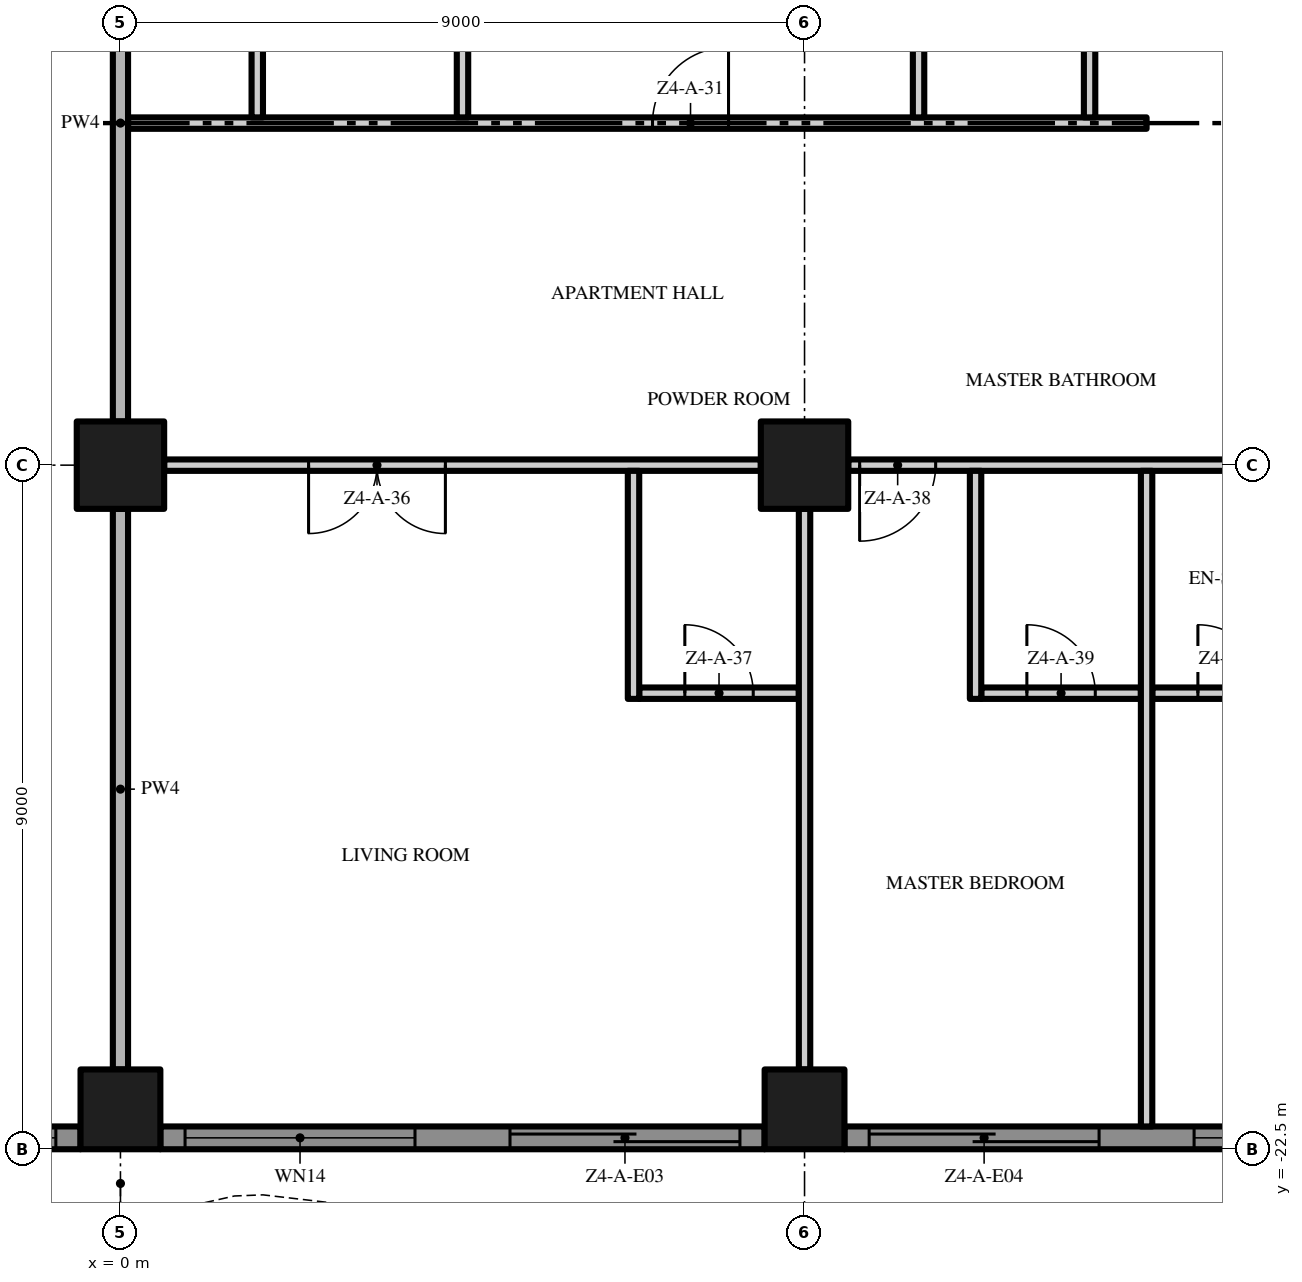
"""IFC4 building model, lengths in metres.
Left out: names, types, materials, properties, quantities, classifications, styles, units other than length and angle.
Written with IfcOpenShell. Run it as: python <this file> out.ifc"""

import sys

from ifc_helpers import new_model, si_unit, direction, frame, frame_2d, origin, origin_2d, place, context, subcontext, project, spatial, polyline, rectangle, outline, extrude, element, fill, save


model = new_model("IFC4")
c1 = context("Model", 3, precision=1e-05, world=origin(), true_north=direction((0.0, 1.0)))
c2 = subcontext(c1, "Body", "Model", "MODEL_VIEW")
j1 = project(units=[si_unit("LENGTHUNIT", "METRE"), si_unit("PLANEANGLEUNIT", "RADIAN")], contexts=[c1])
p1 = place(None, origin())
s1 = spatial("IfcSite", under=j1, at=p1, CompositionType="ELEMENT")
p2 = place(p1, origin())
s2 = spatial("IfcBuilding", under=s1, at=p2, CompositionType="ELEMENT")
p3 = place(p2, frame((0.0, 0.0, 184.4)))
s3 = spatial("IfcBuildingStorey", under=s2, at=p3, CompositionType="ELEMENT", Elevation=184.4)
p4 = place(p3, frame((0.0, -13.5, 0.0), z_axis=(0.0, 0.0, 1.0), x_axis=(1.0, 0.0, 0.0)))
e1 = element("IfcColumn", 1, at=p4, inside=s3, PredefinedType="COLUMN", context=c2, shape_type="SweptSolid", body=[
    extrude(rectangle(XDim=1.15, YDim=1.15, at=origin_2d()), origin(), (0.0, 0.0, 1.0), 3.5),
])
p5 = place(p3, frame((0.0, -21.975, 0.0), z_axis=(0.0, 0.0, 1.0), x_axis=(1.0, 0.0, 0.0)))
e2 = element("IfcColumn", 2, at=p5, inside=s3, PredefinedType="COLUMN", context=c2, shape_type="SweptSolid", body=[
    extrude(rectangle(XDim=1.05, YDim=1.05, at=origin_2d()), origin(), (0.0, 0.0, 1.0), 3.5),
])
p6 = place(p3, frame((9.0, -13.5, 0.0), z_axis=(0.0, 0.0, 1.0), x_axis=(1.0, 0.0, 0.0)))
e3 = element("IfcColumn", 3, at=p6, inside=s3, PredefinedType="COLUMN", context=c2, shape_type="SweptSolid", body=[
    extrude(rectangle(XDim=1.15, YDim=1.15, at=origin_2d()), origin(), (0.0, 0.0, 1.0), 3.5),
])
p7 = place(p3, frame((9.0, -21.975, 0.0), z_axis=(0.0, 0.0, 1.0), x_axis=(1.0, 0.0, 0.0)))
e4 = element("IfcColumn", 4, at=p7, inside=s3, PredefinedType="COLUMN", context=c2, shape_type="SweptSolid", body=[
    extrude(rectangle(XDim=1.05, YDim=1.05, at=origin_2d()), origin(), (0.0, 0.0, 1.0), 3.5),
])
p8 = place(p3, frame((-0.525, -22.35, 0.0), z_axis=(0.0, 0.0, 1.0), x_axis=(-1.0, 0.0, 0.0)))
e5 = element("IfcWall", 5, at=p8, inside=s3, PredefinedType="SOLIDWALL", context=c2, shape_type="SweptSolid", body=[
    extrude(rectangle(XDim=7.95, YDim=0.3, at=frame_2d((3.975, 0.0))), origin(), (0.0, 0.0, 1.0), 3.5),
])
p9 = place(p8, frame((4.6, 0.0, 0.0)))
e6 = element("IfcOpeningElement", 6, at=p9, cuts=e5, PredefinedType="OPENING", context=c2, shape_type="SweptSolid", body=[
    extrude(rectangle(XDim=3.025, YDim=2.4, at=frame_2d((1.512, 1.2))), frame((0.0, 0.16, 0.0), z_axis=(0.0, -1.0, 0.0), x_axis=(1.0, 0.0, 0.0)), (0.0, 0.0, 1.0), 0.32),
])
p10 = place(p8, frame((0.325, 0.0, 0.45)))
e7 = element("IfcOpeningElement", 7, at=p10, cuts=e5, PredefinedType="OPENING", context=c2, shape_type="SweptSolid", body=[
    extrude(rectangle(XDim=3.025, YDim=2.65, at=frame_2d((1.512, 1.325))), frame((0.0, 0.16, 0.0), z_axis=(0.0, -1.0, 0.0), x_axis=(1.0, 0.0, 0.0)), (0.0, 0.0, 1.0), 0.32),
])
p11 = place(p3, frame((8.475, -22.35, 0.0), z_axis=(0.0, 0.0, 1.0), x_axis=(-1.0, 0.0, 0.0)))
e8 = element("IfcWall", 8, at=p11, inside=s3, PredefinedType="SOLIDWALL", context=c2, shape_type="SweptSolid", body=[
    extrude(rectangle(XDim=7.95, YDim=0.3, at=frame_2d((3.975, 0.0))), origin(), (0.0, 0.0, 1.0), 3.5),
])
p12 = place(p11, frame((4.6, 0.0, 0.45)))
e9 = element("IfcOpeningElement", 9, at=p12, cuts=e8, PredefinedType="OPENING", context=c2, shape_type="SweptSolid", body=[
    extrude(rectangle(XDim=3.025, YDim=2.65, at=frame_2d((1.512, 1.325))), frame((0.0, 0.16, 0.0), z_axis=(0.0, -1.0, 0.0), x_axis=(1.0, 0.0, 0.0)), (0.0, 0.0, 1.0), 0.32),
])
p13 = place(p11, frame((0.325, 0.0, 0.0)))
e10 = element("IfcOpeningElement", 10, at=p13, cuts=e8, PredefinedType="OPENING", context=c2, shape_type="SweptSolid", body=[
    extrude(rectangle(XDim=3.025, YDim=2.4, at=frame_2d((1.512, 1.2))), frame((0.0, 0.16, 0.0), z_axis=(0.0, -1.0, 0.0), x_axis=(1.0, 0.0, 0.0)), (0.0, 0.0, 1.0), 0.32),
])
p14 = place(p3, frame((17.475, -22.35, 0.0), z_axis=(0.0, 0.0, 1.0), x_axis=(-1.0, 0.0, 0.0)))
e11 = element("IfcWall", 11, at=p14, inside=s3, PredefinedType="SOLIDWALL", context=c2, shape_type="SweptSolid", body=[
    extrude(rectangle(XDim=7.95, YDim=0.3, at=frame_2d((3.975, 0.0))), origin(), (0.0, 0.0, 1.0), 3.5),
])
p15 = place(p14, frame((4.6, 0.0, 0.0)))
e12 = element("IfcOpeningElement", 12, at=p15, cuts=e11, PredefinedType="OPENING", context=c2, shape_type="SweptSolid", body=[
    extrude(rectangle(XDim=3.025, YDim=2.4, at=frame_2d((1.512, 1.2))), frame((0.0, 0.16, 0.0), z_axis=(0.0, -1.0, 0.0), x_axis=(1.0, 0.0, 0.0)), (0.0, 0.0, 1.0), 0.32),
])
p16 = place(p14, frame((0.325, 0.0, 0.45)))
e13 = element("IfcOpeningElement", 13, at=p16, cuts=e11, PredefinedType="OPENING", context=c2, shape_type="SweptSolid", body=[
    extrude(rectangle(XDim=3.025, YDim=2.65, at=frame_2d((1.512, 1.325))), frame((0.0, 0.16, 0.0), z_axis=(0.0, -1.0, 0.0), x_axis=(1.0, 0.0, 0.0)), (0.0, 0.0, 1.0), 0.32),
])
p17 = place(p3, origin())
e14 = element("IfcWall", 14, at=p17, inside=s3, PredefinedType="USERDEFINED", context=c2, shape_type="SweptSolid", body=[
    extrude(outline(polyline([(-22.5, -25.149), (-21.0, -25.485), (-20.625, -25.5), (-19.5, -25.369), (-18.0, -24.845), (-16.5, -24.112), (-15.0, -23.451), (-13.5, -23.115), (-13.125, -23.1), (-12.0, -23.231), (-10.5, -23.755), (-9.0, -24.488), (-7.5, -25.149), (-6.0, -25.485), (-5.625, -25.5), (-4.5, -25.369), (-3.0, -24.845), (-1.5, -24.112), (0.0, -23.451), (1.5, -23.115), (1.875, -23.1), (3.0, -23.231), (4.5, -23.755), (6.0, -24.488), (7.5, -25.149), (9.0, -25.485), (9.375, -25.5), (10.5, -25.369), (12.0, -24.845), (13.5, -24.112), (15.0, -23.451), (16.5, -23.115), (16.875, -23.1), (18.0, -23.231), (19.5, -23.755), (21.0, -24.488), (22.5, -25.149), (22.601, -24.92), (21.105, -24.261), (19.596, -23.524), (18.056, -22.986), (16.885, -22.849), (16.467, -22.866), (14.921, -23.213), (13.395, -23.885), (11.904, -24.614), (10.444, -25.124), (9.365, -25.249), (9.033, -25.236), (7.579, -24.91), (6.105, -24.261), (4.596, -23.524), (3.056, -22.986), (1.885, -22.849), (1.467, -22.866), (-0.079, -23.213), (-1.605, -23.885), (-3.096, -24.614), (-4.556, -25.124), (-5.635, -25.249), (-5.967, -25.236), (-7.421, -24.91), (-8.895, -24.261), (-10.404, -23.524), (-11.944, -22.986), (-13.115, -22.849), (-13.533, -22.866), (-15.079, -23.213), (-16.605, -23.885), (-18.096, -24.614), (-19.556, -25.124), (-20.635, -25.249), (-20.967, -25.236), (-22.445, -24.905), (-22.5, -25.149)])), origin(), (0.0, 0.0, 1.0), 0.9),
])
p18 = place(p3, frame((6.825, -16.5, 0.0), z_axis=(0.0, 0.0, 1.0), x_axis=(1.0, 0.0, 0.0)))
e15 = element("IfcWall", 15, at=p18, inside=s3, PredefinedType="PARTITIONING", context=c2, shape_type="SweptSolid", body=[
    extrude(rectangle(XDim=2.1, YDim=0.15, at=frame_2d((1.05, 0.0))), origin(), (0.0, 0.0, 1.0), 3.5),
])
p19 = place(p18, frame((0.6, 0.0, 0.0)))
e16 = element("IfcOpeningElement", 16, at=p19, cuts=e15, PredefinedType="OPENING", context=c2, shape_type="SweptSolid", body=[
    extrude(rectangle(XDim=0.9, YDim=2.1, at=frame_2d((0.45, 1.05))), frame((0.0, 0.085, 0.0), z_axis=(0.0, -1.0, 0.0), x_axis=(1.0, 0.0, 0.0)), (0.0, 0.0, 1.0), 0.17),
])
p20 = place(p3, frame((11.325, -16.5, 0.0), z_axis=(0.0, 0.0, 1.0), x_axis=(1.0, 0.0, 0.0)))
e17 = element("IfcWall", 17, at=p20, inside=s3, PredefinedType="PARTITIONING", context=c2, shape_type="SweptSolid", body=[
    extrude(rectangle(XDim=2.1, YDim=0.15, at=frame_2d((1.05, 0.0))), origin(), (0.0, 0.0, 1.0), 3.5),
])
p21 = place(p20, frame((0.6, 0.0, 0.0)))
e18 = element("IfcOpeningElement", 18, at=p21, cuts=e17, PredefinedType="OPENING", context=c2, shape_type="SweptSolid", body=[
    extrude(rectangle(XDim=0.9, YDim=2.1, at=frame_2d((0.45, 1.05))), frame((0.0, 0.085, 0.0), z_axis=(0.0, -1.0, 0.0), x_axis=(1.0, 0.0, 0.0)), (0.0, 0.0, 1.0), 0.17),
])
p22 = place(p3, frame((13.575, -16.5, 0.0), z_axis=(0.0, 0.0, 1.0), x_axis=(1.0, 0.0, 0.0)))
e19 = element("IfcWall", 19, at=p22, inside=s3, PredefinedType="PARTITIONING", context=c2, shape_type="SweptSolid", body=[
    extrude(rectangle(XDim=2.1, YDim=0.15, at=frame_2d((1.05, 0.0))), origin(), (0.0, 0.0, 1.0), 3.5),
])
p23 = place(p22, frame((0.6, 0.0, 0.0)))
e20 = element("IfcOpeningElement", 20, at=p23, cuts=e19, PredefinedType="OPENING", context=c2, shape_type="SweptSolid", body=[
    extrude(rectangle(XDim=0.9, YDim=2.1, at=frame_2d((0.45, 1.05))), frame((0.0, 0.085, 0.0), z_axis=(0.0, -1.0, 0.0), x_axis=(1.0, 0.0, 0.0)), (0.0, 0.0, 1.0), 0.17),
])
p24 = place(p3, frame((8.425, -13.5, 0.0), z_axis=(0.0, 0.0, 1.0), x_axis=(-1.0, 0.0, 0.0)))
e21 = element("IfcWall", 21, at=p24, inside=s3, PredefinedType="PARTITIONING", context=c2, shape_type="SweptSolid", body=[
    extrude(rectangle(XDim=7.85, YDim=0.15, at=frame_2d((3.925, 0.0))), origin(), (0.0, 0.0, 1.0), 3.5),
])
p25 = place(p24, frame((4.15, 0.0, 0.0)))
e22 = element("IfcOpeningElement", 22, at=p25, cuts=e21, PredefinedType="OPENING", context=c2, shape_type="SweptSolid", body=[
    extrude(rectangle(XDim=1.8, YDim=2.4, at=frame_2d((0.9, 1.2))), frame((0.0, 0.085, 0.0), z_axis=(0.0, -1.0, 0.0), x_axis=(1.0, 0.0, 0.0)), (0.0, 0.0, 1.0), 0.17),
])
p26 = place(p3, frame((17.425, -13.5, 0.0), z_axis=(0.0, 0.0, 1.0), x_axis=(-1.0, 0.0, 0.0)))
e23 = element("IfcWall", 23, at=p26, inside=s3, PredefinedType="PARTITIONING", context=c2, shape_type="SweptSolid", body=[
    extrude(rectangle(XDim=7.85, YDim=0.15, at=frame_2d((3.925, 0.0))), origin(), (0.0, 0.0, 1.0), 3.5),
])
p27 = place(p26, frame((6.7, 0.0, 0.0)))
e24 = element("IfcOpeningElement", 24, at=p27, cuts=e23, PredefinedType="OPENING", context=c2, shape_type="SweptSolid", body=[
    extrude(rectangle(XDim=1.0, YDim=2.4, at=frame_2d((0.5, 1.2))), frame((0.0, 0.085, 0.0), z_axis=(0.0, -1.0, 0.0), x_axis=(1.0, 0.0, 0.0)), (0.0, 0.0, 1.0), 0.17),
])
p28 = place(p26, frame((0.15, 0.0, 0.0)))
e25 = element("IfcOpeningElement", 25, at=p28, cuts=e23, PredefinedType="OPENING", context=c2, shape_type="SweptSolid", body=[
    extrude(rectangle(XDim=1.0, YDim=2.4, at=frame_2d((0.5, 1.2))), frame((0.0, 0.085, 0.0), z_axis=(0.0, -1.0, 0.0), x_axis=(1.0, 0.0, 0.0)), (0.0, 0.0, 1.0), 0.17),
])
p29 = place(p3, frame((0.1, -9.0, 0.0), z_axis=(0.0, 0.0, 1.0), x_axis=(1.0, 0.0, 0.0)))
e26 = element("IfcWall", 26, at=p29, inside=s3, PredefinedType="PARTITIONING", context=c2, shape_type="SweptSolid", body=[
    extrude(rectangle(XDim=13.4, YDim=0.15, at=frame_2d((6.7, 0.0))), origin(), (0.0, 0.0, 1.0), 3.5),
])
p30 = place(p29, frame((6.9, 0.0, 0.0)))
e27 = element("IfcOpeningElement", 27, at=p30, cuts=e26, PredefinedType="OPENING", context=c2, shape_type="SweptSolid", body=[
    extrude(rectangle(XDim=1.0, YDim=2.4, at=frame_2d((0.5, 1.2))), frame((0.0, 0.085, 0.0), z_axis=(0.0, -1.0, 0.0), x_axis=(1.0, 0.0, 0.0)), (0.0, 0.0, 1.0), 0.17),
])
p31 = place(p3, frame((0.0, -21.45, 0.0), z_axis=(0.0, 0.0, 1.0), x_axis=(0.0, 1.0, 0.0)))
e28 = element("IfcWall", 28, at=p31, inside=s3, PredefinedType="PARTITIONING", context=c2, shape_type="SweptSolid", body=[
    extrude(rectangle(XDim=7.375, YDim=0.2, at=frame_2d((3.688, 0.0))), origin(), (0.0, 0.0, 1.0), 3.5),
])
p32 = place(p3, frame((0.0, -12.925, 0.0), z_axis=(0.0, 0.0, 1.0), x_axis=(0.0, 1.0, 0.0)))
e29 = element("IfcWall", 29, at=p32, inside=s3, PredefinedType="PARTITIONING", context=c2, shape_type="SweptSolid", body=[
    extrude(rectangle(XDim=7.85, YDim=0.2, at=frame_2d((3.925, 0.0))), origin(), (0.0, 0.0, 1.0), 3.5),
])
for number, where, z_axis, x_axis in (
    (30, (1.8, -8.925, 0.0), (0.0, 0.0, 1.0), (0.0, 1.0, 0.0)),
    (31, (4.5, -8.925, 0.0), (0.0, 0.0, 1.0), (0.0, 1.0, 0.0)),
):
    element("IfcWall", number, at=place(p3, frame(where, z_axis=z_axis, x_axis=x_axis)), inside=s3, PredefinedType="PARTITIONING", context=c2, shape_type="SweptSolid", body=[
        extrude(rectangle(XDim=4.35, YDim=0.15, at=frame_2d((2.175, 0.0))), origin(), (0.0, 0.0, 1.0), 3.5),
    ])
p33 = place(p3, frame((6.75, -16.575, 0.0), z_axis=(0.0, 0.0, 1.0), x_axis=(0.0, 1.0, 0.0)))
e32 = element("IfcWall", 32, at=p33, inside=s3, PredefinedType="PARTITIONING", context=c2, shape_type="SweptSolid", body=[
    extrude(rectangle(XDim=3.0, YDim=0.15, at=frame_2d((1.5, 0.0))), origin(), (0.0, 0.0, 1.0), 3.5),
])
p34 = place(p3, frame((9.0, -21.45, 0.0), z_axis=(0.0, 0.0, 1.0), x_axis=(0.0, 1.0, 0.0)))
e33 = element("IfcWall", 33, at=p34, inside=s3, PredefinedType="PARTITIONING", context=c2, shape_type="SweptSolid", body=[
    extrude(rectangle(XDim=7.375, YDim=0.15, at=frame_2d((3.688, 0.0))), origin(), (0.0, 0.0, 1.0), 3.5),
])
p35 = place(p3, frame((10.5, -8.925, 0.0), z_axis=(0.0, 0.0, 1.0), x_axis=(0.0, 1.0, 0.0)))
e34 = element("IfcWall", 34, at=p35, inside=s3, PredefinedType="PARTITIONING", context=c2, shape_type="SweptSolid", body=[
    extrude(rectangle(XDim=4.35, YDim=0.15, at=frame_2d((2.175, 0.0))), origin(), (0.0, 0.0, 1.0), 3.5),
])
p36 = place(p3, frame((11.25, -16.575, 0.0), z_axis=(0.0, 0.0, 1.0), x_axis=(0.0, 1.0, 0.0)))
e35 = element("IfcWall", 35, at=p36, inside=s3, PredefinedType="PARTITIONING", context=c2, shape_type="SweptSolid", body=[
    extrude(rectangle(XDim=3.0, YDim=0.15, at=frame_2d((1.5, 0.0))), origin(), (0.0, 0.0, 1.0), 3.5),
])
p37 = place(p3, frame((12.75, -8.925, 0.0), z_axis=(0.0, 0.0, 1.0), x_axis=(0.0, 1.0, 0.0)))
e36 = element("IfcWall", 36, at=p37, inside=s3, PredefinedType="PARTITIONING", context=c2, shape_type="SweptSolid", body=[
    extrude(rectangle(XDim=4.5, YDim=0.15, at=frame_2d((2.25, 0.0))), origin(), (0.0, 0.0, 1.0), 3.5),
])
p38 = place(p37, frame((1.75, 0.0, 0.0)))
e37 = element("IfcOpeningElement", 37, at=p38, cuts=e36, PredefinedType="OPENING", context=c2, shape_type="SweptSolid", body=[
    extrude(rectangle(XDim=0.9, YDim=2.1, at=frame_2d((0.45, 1.05))), frame((0.0, 0.085, 0.0), z_axis=(0.0, -1.0, 0.0), x_axis=(1.0, 0.0, 0.0)), (0.0, 0.0, 1.0), 0.17),
])
p39 = place(p3, frame((13.5, -22.2, 0.0), z_axis=(0.0, 0.0, 1.0), x_axis=(0.0, 1.0, 0.0)))
e38 = element("IfcWall", 38, at=p39, inside=s3, PredefinedType="PARTITIONING", context=c2, shape_type="SweptSolid", body=[
    extrude(rectangle(XDim=8.625, YDim=0.15, at=frame_2d((4.312, 0.0))), origin(), (0.0, 0.0, 1.0), 3.5),
])
p40 = place(p10, origin())
e39 = element("IfcWindow", 39, at=p40, inside=s3, PartitioningType="SINGLE_PANEL", PredefinedType="WINDOW", context=c2, shape_type="SweptSolid", body=[
    extrude(rectangle(XDim=3.025, YDim=2.65, at=frame_2d((1.512, 1.325))), frame((0.0, 0.03, 0.0), z_axis=(0.0, -1.0, 0.0), x_axis=(1.0, 0.0, 0.0)), (0.0, 0.0, 1.0), 0.06),
])
fill(e7, e39)
p41 = place(p12, origin())
e40 = element("IfcWindow", 40, at=p41, inside=s3, PartitioningType="SINGLE_PANEL", PredefinedType="WINDOW", context=c2, shape_type="SweptSolid", body=[
    extrude(rectangle(XDim=3.025, YDim=2.65, at=frame_2d((1.512, 1.325))), frame((0.0, 0.03, 0.0), z_axis=(0.0, -1.0, 0.0), x_axis=(1.0, 0.0, 0.0)), (0.0, 0.0, 1.0), 0.06),
])
fill(e9, e40)
p42 = place(p13, origin())
e41 = element("IfcDoor", 41, at=p42, inside=s3, OperationType="SINGLE_SWING_LEFT", PredefinedType="DOOR", context=c2, shape_type="SweptSolid", body=[
    extrude(rectangle(XDim=3.025, YDim=2.4, at=frame_2d((1.512, 1.2))), frame((0.0, 0.025, 0.0), z_axis=(0.0, -1.0, 0.0), x_axis=(1.0, 0.0, 0.0)), (0.0, 0.0, 1.0), 0.05),
])
fill(e10, e41)
p43 = place(p15, origin())
e42 = element("IfcDoor", 42, at=p43, inside=s3, OperationType="SINGLE_SWING_LEFT", PredefinedType="DOOR", context=c2, shape_type="SweptSolid", body=[
    extrude(rectangle(XDim=3.025, YDim=2.4, at=frame_2d((1.512, 1.2))), frame((0.0, 0.025, 0.0), z_axis=(0.0, -1.0, 0.0), x_axis=(1.0, 0.0, 0.0)), (0.0, 0.0, 1.0), 0.05),
])
fill(e12, e42)
p44 = place(p16, origin())
e43 = element("IfcWindow", 43, at=p44, inside=s3, PartitioningType="SINGLE_PANEL", PredefinedType="WINDOW", context=c2, shape_type="SweptSolid", body=[
    extrude(rectangle(XDim=3.025, YDim=2.65, at=frame_2d((1.512, 1.325))), frame((0.0, 0.03, 0.0), z_axis=(0.0, -1.0, 0.0), x_axis=(1.0, 0.0, 0.0)), (0.0, 0.0, 1.0), 0.06),
])
fill(e13, e43)
p45 = place(p30, origin())
e44 = element("IfcDoor", 44, at=p45, inside=s3, OperationType="SINGLE_SWING_RIGHT", PredefinedType="DOOR", context=c2, shape_type="SweptSolid", body=[
    extrude(rectangle(XDim=1.0, YDim=2.4, at=frame_2d((0.5, 1.2))), frame((0.0, 0.025, 0.0), z_axis=(0.0, -1.0, 0.0), x_axis=(1.0, 0.0, 0.0)), (0.0, 0.0, 1.0), 0.05),
])
fill(e27, e44)
p46 = place(p25, origin())
e45 = element("IfcDoor", 45, at=p46, inside=s3, OperationType="DOUBLE_DOOR_SINGLE_SWING", PredefinedType="DOOR", context=c2, shape_type="SweptSolid", body=[
    extrude(rectangle(XDim=1.8, YDim=2.4, at=frame_2d((0.9, 1.2))), frame((0.0, 0.025, 0.0), z_axis=(0.0, -1.0, 0.0), x_axis=(1.0, 0.0, 0.0)), (0.0, 0.0, 1.0), 0.05),
])
fill(e22, e45)
p47 = place(p19, origin())
e46 = element("IfcDoor", 46, at=p47, inside=s3, OperationType="SINGLE_SWING_LEFT", PredefinedType="DOOR", context=c2, shape_type="SweptSolid", body=[
    extrude(rectangle(XDim=0.9, YDim=2.1, at=frame_2d((0.45, 1.05))), frame((0.0, 0.025, 0.0), z_axis=(0.0, -1.0, 0.0), x_axis=(1.0, 0.0, 0.0)), (0.0, 0.0, 1.0), 0.05),
])
fill(e16, e46)
p48 = place(p27, origin())
e47 = element("IfcDoor", 47, at=p48, inside=s3, OperationType="SINGLE_SWING_RIGHT", PredefinedType="DOOR", context=c2, shape_type="SweptSolid", body=[
    extrude(rectangle(XDim=1.0, YDim=2.4, at=frame_2d((0.5, 1.2))), frame((0.0, 0.025, 0.0), z_axis=(0.0, -1.0, 0.0), x_axis=(1.0, 0.0, 0.0)), (0.0, 0.0, 1.0), 0.05),
])
fill(e24, e47)
p49 = place(p21, origin())
e48 = element("IfcDoor", 48, at=p49, inside=s3, OperationType="SINGLE_SWING_LEFT", PredefinedType="DOOR", context=c2, shape_type="SweptSolid", body=[
    extrude(rectangle(XDim=0.9, YDim=2.1, at=frame_2d((0.45, 1.05))), frame((0.0, 0.025, 0.0), z_axis=(0.0, -1.0, 0.0), x_axis=(1.0, 0.0, 0.0)), (0.0, 0.0, 1.0), 0.05),
])
fill(e18, e48)
p50 = place(p23, origin())
e49 = element("IfcDoor", 49, at=p50, inside=s3, OperationType="SINGLE_SWING_LEFT", PredefinedType="DOOR", context=c2, shape_type="SweptSolid", body=[
    extrude(rectangle(XDim=0.9, YDim=2.1, at=frame_2d((0.45, 1.05))), frame((0.0, 0.025, 0.0), z_axis=(0.0, -1.0, 0.0), x_axis=(1.0, 0.0, 0.0)), (0.0, 0.0, 1.0), 0.05),
])
fill(e20, e49)
save(model, sys.argv[1])
